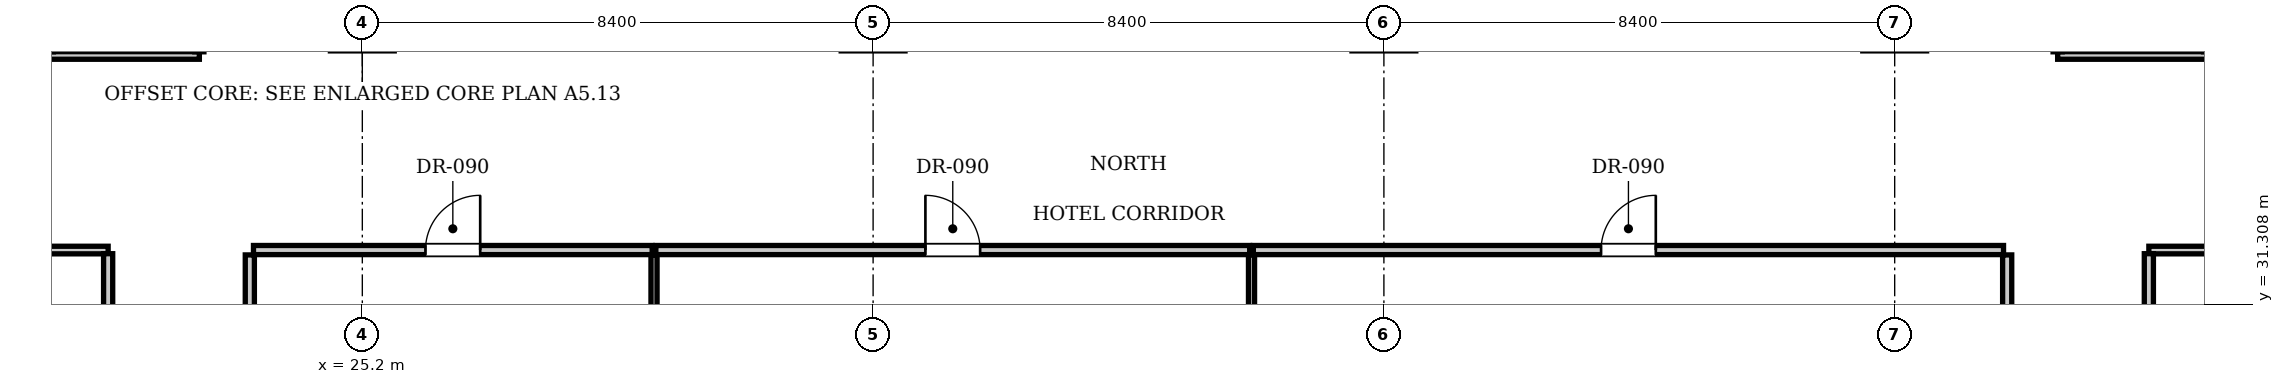
"""IFC4 building model, lengths in metres.
Left out: names, types, materials, properties, quantities, classifications, styles, units other than length and angle.
Written with IfcOpenShell. Run it as: python <this file> out.ifc"""

import sys

from ifc_helpers import new_model, si_unit, direction, frame, frame_2d, origin, place, context, subcontext, project, spatial, rectangle, extrude, element, fill, save


model = new_model("IFC4")
c1 = context("Model", 3, precision=1e-05, world=origin(), true_north=direction((0.0, 1.0)))
c2 = subcontext(c1, "Body", "Model", "MODEL_VIEW")
j1 = project(units=[si_unit("LENGTHUNIT", "METRE"), si_unit("PLANEANGLEUNIT", "RADIAN")], contexts=[c1])
p1 = place(None, origin())
s1 = spatial("IfcSite", under=j1, at=p1, CompositionType="ELEMENT")
p2 = place(p1, origin())
s2 = spatial("IfcBuilding", under=s1, at=p2, CompositionType="ELEMENT")
p3 = place(p2, frame((0.0, 0.0, 50.05)))
s3 = spatial("IfcBuildingStorey", under=s2, at=p3, CompositionType="ELEMENT", Elevation=50.05)
for number, where, z_axis, x_axis in (
    (1, (23.35, 24.58, 0.0), (0.0, 0.0, 1.0), (0.0, 1.0, 0.0)),
    (2, (52.25, 24.58, 0.0), (0.0, 0.0, 1.0), (0.0, 1.0, 0.0)),
):
    element("IfcWall", number, at=place(p3, frame(where, z_axis=z_axis, x_axis=x_axis)), inside=s3, PredefinedType="PARTITIONING", context=c2, shape_type="SweptSolid", body=[
        extrude(rectangle(XDim=7.54, YDim=0.15, at=frame_2d((3.77, 0.0))), origin(), (0.0, 0.0, 1.0), 3.61),
    ])
p4 = place(p3, frame((23.41, 32.2, 0.0), z_axis=(0.0, 0.0, 1.0), x_axis=(1.0, 0.0, 0.0)))
e3 = element("IfcWall", 3, at=p4, inside=s3, PredefinedType="PARTITIONING", context=c2, shape_type="SweptSolid", body=[
    extrude(rectangle(XDim=6.557, YDim=0.15, at=frame_2d((3.279, 0.0))), origin(), (0.0, 0.0, 1.0), 3.61),
])
p5 = place(p4, frame((2.829, 0.0, 0.0)))
e4 = element("IfcOpeningElement", 4, at=p5, cuts=e3, PredefinedType="OPENING", context=c2, shape_type="SweptSolid", body=[
    extrude(rectangle(XDim=0.9, YDim=2.1, at=frame_2d((0.45, 1.05))), frame((0.0, 0.085, 0.0), z_axis=(0.0, -1.0, 0.0), x_axis=(1.0, 0.0, 0.0)), (0.0, 0.0, 1.0), 0.17),
])
p6 = place(p3, frame((29.997, 24.58, 0.0), z_axis=(0.0, 0.0, 1.0), x_axis=(0.0, 1.0, 0.0)))
e5 = element("IfcWall", 5, at=p6, inside=s3, PredefinedType="PARTITIONING", context=c2, shape_type="SweptSolid", body=[
    extrude(rectangle(XDim=7.54, YDim=0.1, at=frame_2d((3.77, 0.0))), origin(), (0.0, 0.0, 1.0), 3.61),
])
p7 = place(p3, frame((30.027, 32.2, 0.0), z_axis=(0.0, 0.0, 1.0), x_axis=(1.0, 0.0, 0.0)))
e6 = element("IfcWall", 6, at=p7, inside=s3, PredefinedType="PARTITIONING", context=c2, shape_type="SweptSolid", body=[
    extrude(rectangle(XDim=9.766, YDim=0.15, at=frame_2d((4.883, 0.0))), origin(), (0.0, 0.0, 1.0), 3.61),
])
p8 = place(p7, frame((4.433, 0.0, 0.0)))
e7 = element("IfcOpeningElement", 7, at=p8, cuts=e6, PredefinedType="OPENING", context=c2, shape_type="SweptSolid", body=[
    extrude(rectangle(XDim=0.9, YDim=2.1, at=frame_2d((0.45, 1.05))), frame((0.0, 0.085, 0.0), z_axis=(0.0, -1.0, 0.0), x_axis=(1.0, 0.0, 0.0)), (0.0, 0.0, 1.0), 0.17),
])
p9 = place(p3, frame((39.823, 24.58, 0.0), z_axis=(0.0, 0.0, 1.0), x_axis=(0.0, 1.0, 0.0)))
e8 = element("IfcWall", 8, at=p9, inside=s3, PredefinedType="PARTITIONING", context=c2, shape_type="SweptSolid", body=[
    extrude(rectangle(XDim=7.54, YDim=0.1, at=frame_2d((3.77, 0.0))), origin(), (0.0, 0.0, 1.0), 3.61),
])
p10 = place(p3, frame((39.853, 32.2, 0.0), z_axis=(0.0, 0.0, 1.0), x_axis=(1.0, 0.0, 0.0)))
e9 = element("IfcWall", 9, at=p10, inside=s3, PredefinedType="PARTITIONING", context=c2, shape_type="SweptSolid", body=[
    extrude(rectangle(XDim=12.337, YDim=0.15, at=frame_2d((6.168, 0.0))), origin(), (0.0, 0.0, 1.0), 3.61),
])
p11 = place(p10, frame((5.719, 0.0, 0.0)))
e10 = element("IfcOpeningElement", 10, at=p11, cuts=e9, PredefinedType="OPENING", context=c2, shape_type="SweptSolid", body=[
    extrude(rectangle(XDim=0.9, YDim=2.1, at=frame_2d((0.45, 1.05))), frame((0.0, 0.085, 0.0), z_axis=(0.0, -1.0, 0.0), x_axis=(1.0, 0.0, 0.0)), (0.0, 0.0, 1.0), 0.17),
])
p12 = place(p3, frame((10.9, 32.2, 0.0), z_axis=(0.0, 0.0, 1.0), x_axis=(1.0, 0.0, 0.0)))
e11 = element("IfcWall", 11, at=p12, inside=s3, PredefinedType="PARTITIONING", context=c2, shape_type="SweptSolid", body=[
    extrude(rectangle(XDim=10.12, YDim=0.125, at=frame_2d((5.06, 0.0))), origin(), (0.0, 0.0, 1.0), 3.61),
])
p13 = place(p3, frame((54.58, 32.2, 0.0), z_axis=(0.0, 0.0, 1.0), x_axis=(1.0, 0.0, 0.0)))
e12 = element("IfcWall", 12, at=p13, inside=s3, PredefinedType="PARTITIONING", context=c2, shape_type="SweptSolid", body=[
    extrude(rectangle(XDim=10.12, YDim=0.125, at=frame_2d((5.06, 0.0))), origin(), (0.0, 0.0, 1.0), 3.61),
])
p14 = place(p3, frame((21.02, 30.25, 0.0), z_axis=(0.0, 0.0, 1.0), x_axis=(0.0, 1.0, 0.0)))
e13 = element("IfcWall", 13, at=p14, inside=s3, PredefinedType="PARTITIONING", context=c2, shape_type="SweptSolid", body=[
    extrude(rectangle(XDim=1.89, YDim=0.15, at=frame_2d((0.945, 0.0))), origin(), (0.0, 0.0, 1.0), 3.207),
])
p15 = place(p3, frame((54.58, 30.25, 0.0), z_axis=(0.0, 0.0, 1.0), x_axis=(0.0, 1.0, 0.0)))
e14 = element("IfcWall", 14, at=p15, inside=s3, PredefinedType="PARTITIONING", context=c2, shape_type="SweptSolid", body=[
    extrude(rectangle(XDim=1.89, YDim=0.15, at=frame_2d((0.945, 0.0))), origin(), (0.0, 0.0, 1.0), 3.263),
])
p16 = place(p3, frame((10.9, 35.4, 0.0), z_axis=(0.0, 0.0, 1.0), x_axis=(1.0, 0.0, 0.0)))
e15 = element("IfcWall", 15, at=p16, inside=s3, PredefinedType="PARTITIONING", context=c2, shape_type="SweptSolid", body=[
    extrude(rectangle(XDim=11.62, YDim=0.125, at=frame_2d((5.81, 0.0))), origin(), (0.0, 0.0, 1.0), 3.61),
])
p17 = place(p3, frame((53.08, 35.4, 0.0), z_axis=(0.0, 0.0, 1.0), x_axis=(1.0, 0.0, 0.0)))
e16 = element("IfcWall", 16, at=p17, inside=s3, PredefinedType="PARTITIONING", context=c2, shape_type="SweptSolid", body=[
    extrude(rectangle(XDim=11.62, YDim=0.125, at=frame_2d((5.81, 0.0))), origin(), (0.0, 0.0, 1.0), 3.61),
])
p18 = place(p5, origin())
e17 = element("IfcDoor", 17, at=p18, inside=s3, OperationType="SINGLE_SWING_RIGHT", PredefinedType="DOOR", context=c2, shape_type="SweptSolid", body=[
    extrude(rectangle(XDim=0.9, YDim=2.1, at=frame_2d((0.45, 1.05))), frame((0.0, 0.025, 0.0), z_axis=(0.0, -1.0, 0.0), x_axis=(1.0, 0.0, 0.0)), (0.0, 0.0, 1.0), 0.05),
])
fill(e4, e17)
p19 = place(p8, origin())
e18 = element("IfcDoor", 18, at=p19, inside=s3, OperationType="SINGLE_SWING_LEFT", PredefinedType="DOOR", context=c2, shape_type="SweptSolid", body=[
    extrude(rectangle(XDim=0.9, YDim=2.1, at=frame_2d((0.45, 1.05))), frame((0.0, 0.025, 0.0), z_axis=(0.0, -1.0, 0.0), x_axis=(1.0, 0.0, 0.0)), (0.0, 0.0, 1.0), 0.05),
])
fill(e7, e18)
p20 = place(p11, origin())
e19 = element("IfcDoor", 19, at=p20, inside=s3, OperationType="SINGLE_SWING_RIGHT", PredefinedType="DOOR", context=c2, shape_type="SweptSolid", body=[
    extrude(rectangle(XDim=0.9, YDim=2.1, at=frame_2d((0.45, 1.05))), frame((0.0, 0.025, 0.0), z_axis=(0.0, -1.0, 0.0), x_axis=(1.0, 0.0, 0.0)), (0.0, 0.0, 1.0), 0.05),
])
fill(e10, e19)
save(model, sys.argv[1])
